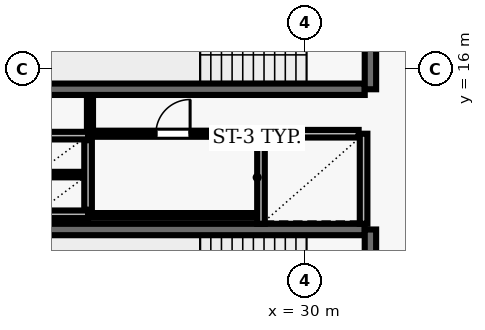
"""IFC4 building model, lengths in metres.
Left out: names, types, materials, properties, quantities, classifications, styles, units other than length and angle.
Written with IfcOpenShell. Run it as: python <this file> out.ifc"""

import sys

from ifc_helpers import new_model, si_unit, direction, frame, frame_2d, origin, place, context, subcontext, project, spatial, rectangle, extrude, element, fill, save


model = new_model("IFC4")
c1 = context("Model", 3, precision=1e-05, world=origin(), true_north=direction((0.0, 1.0)))
c2 = subcontext(c1, "Body", "Model", "MODEL_VIEW")
j1 = project(units=[si_unit("LENGTHUNIT", "METRE"), si_unit("PLANEANGLEUNIT", "RADIAN")], contexts=[c1])
p1 = place(None, origin())
s1 = spatial("IfcSite", under=j1, at=p1, CompositionType="ELEMENT")
p2 = place(p1, origin())
s2 = spatial("IfcBuilding", under=s1, at=p2, CompositionType="ELEMENT")
p3 = place(p2, frame((0.0, 0.0, 146.3)))
s3 = spatial("IfcBuildingStorey", under=s2, at=p3, CompositionType="ELEMENT", Elevation=146.3)
p4 = place(p3, frame((23.22, 15.47, 0.0), z_axis=(0.0, 0.0, 1.0), x_axis=(1.0, 0.0, 0.0)))
e1 = element("IfcWall", 1, at=p4, inside=s3, PredefinedType="SHEAR", context=c2, shape_type="SweptSolid", body=[
    extrude(rectangle(XDim=8.36, YDim=0.3, at=frame_2d((4.18, 0.0))), origin(), (0.0, 0.0, 1.0), 3.69),
])
p5 = place(p3, frame((31.73, 15.47, 0.0), z_axis=(0.0, 0.0, 1.0), x_axis=(0.0, 1.0, 0.0)))
e2 = element("IfcWall", 2, at=p5, inside=s3, PredefinedType="SHEAR", context=c2, shape_type="SweptSolid", body=[
    extrude(rectangle(XDim=3.51, YDim=0.3, at=frame_2d((1.755, 0.0))), origin(), (0.0, 0.0, 1.0), 3.69),
])
p6 = place(p5, frame((1.18, 0.0, 0.0)))
e3 = element("IfcOpeningElement", 3, at=p6, cuts=e2, PredefinedType="OPENING", context=c2, shape_type="SweptSolid", body=[
    extrude(rectangle(XDim=1.15, YDim=2.15, at=frame_2d((0.575, 1.075))), frame((0.0, 0.16, 0.0), z_axis=(0.0, -1.0, 0.0), x_axis=(1.0, 0.0, 0.0)), (0.0, 0.0, 1.0), 0.32),
])
p7 = place(p3, frame((31.58, 11.78, 0.0), z_axis=(0.0, 0.0, 1.0), x_axis=(-1.0, 0.0, 0.0)))
e4 = element("IfcWall", 4, at=p7, inside=s3, PredefinedType="SHEAR", context=c2, shape_type="SweptSolid", body=[
    extrude(rectangle(XDim=8.36, YDim=0.3, at=frame_2d((4.18, 0.0))), origin(), (0.0, 0.0, 1.0), 3.69),
])
p8 = place(p3, frame((31.73, 8.27, 0.0), z_axis=(0.0, 0.0, 1.0), x_axis=(0.0, 1.0, 0.0)))
e5 = element("IfcWall", 5, at=p8, inside=s3, PredefinedType="SHEAR", context=c2, shape_type="SweptSolid", body=[
    extrude(rectangle(XDim=3.51, YDim=0.3, at=frame_2d((1.755, 0.0))), origin(), (0.0, 0.0, 1.0), 3.69),
])
p9 = place(p8, frame((1.18, 0.0, 0.0)))
e6 = element("IfcOpeningElement", 6, at=p9, cuts=e5, PredefinedType="OPENING", context=c2, shape_type="SweptSolid", body=[
    extrude(rectangle(XDim=1.15, YDim=2.15, at=frame_2d((0.575, 1.075))), frame((0.0, 0.16, 0.0), z_axis=(0.0, -1.0, 0.0), x_axis=(1.0, 0.0, 0.0)), (0.0, 0.0, 1.0), 0.32),
])
for number, where, z_axis, x_axis in (
    (7, (28.85, 14.3, 0.0), (0.0, 0.0, 1.0), (0.0, -1.0, 0.0)),
    (8, (31.55, 11.93, 0.0), (0.0, 0.0, 1.0), (0.0, 1.0, 0.0)),
):
    element("IfcWall", number, at=place(p3, frame(where, z_axis=z_axis, x_axis=x_axis)), inside=s3, PredefinedType="SOLIDWALL", context=c2, shape_type="SweptSolid", body=[
        extrude(rectangle(XDim=2.37, YDim=0.2, at=frame_2d((1.185, 0.0))), origin(), (0.0, 0.0, 1.0), 3.69),
    ])
p10 = place(p3, frame((31.42, 14.3, 0.0), z_axis=(0.0, 0.0, 1.0), x_axis=(-1.0, 0.0, 0.0)))
e9 = element("IfcWall", 9, at=p10, inside=s3, PredefinedType="SOLIDWALL", context=c2, shape_type="SweptSolid", body=[
    extrude(rectangle(XDim=2.44, YDim=0.2, at=frame_2d((1.22, 0.0))), origin(), (0.0, 0.0, 1.0), 3.69),
])
for number, where, z_axis, x_axis in (
    (10, (22.9, 14.25, 0.0), (0.0, 0.0, 1.0), (1.0, 0.0, 0.0)),
    (11, (22.9, 12.18, 0.0), (0.0, 0.0, 1.0), (1.0, 0.0, 0.0)),
):
    element("IfcWall", number, at=place(p3, frame(where, z_axis=z_axis, x_axis=x_axis)), inside=s3, PredefinedType="SOLIDWALL", context=c2, shape_type="SweptSolid", body=[
        extrude(rectangle(XDim=1.4, YDim=0.2, at=frame_2d((0.7, 0.0))), origin(), (0.0, 0.0, 1.0), 3.69),
    ])
p11 = place(p3, frame((24.3, 12.3, 0.0), z_axis=(0.0, 0.0, 1.0), x_axis=(0.0, 1.0, 0.0)))
e12 = element("IfcWall", 12, at=p11, inside=s3, PredefinedType="SOLIDWALL", context=c2, shape_type="SweptSolid", body=[
    extrude(rectangle(XDim=1.83, YDim=0.2, at=frame_2d((0.915, 0.0))), origin(), (0.0, 0.0, 1.0), 3.69),
])
p12 = place(p3, frame((23.01, 13.225, 0.0), z_axis=(0.0, 0.0, 1.0), x_axis=(1.0, 0.0, 0.0)))
e13 = element("IfcWall", 13, at=p12, inside=s3, PredefinedType="PARTITIONING", context=c2, shape_type="SweptSolid", body=[
    extrude(rectangle(XDim=1.18, YDim=0.145, at=frame_2d((0.59, 0.0))), origin(), (0.0, 0.0, 1.0), 3.69),
])
p13 = place(p3, frame((24.35, 12.15, 0.0), z_axis=(0.0, 0.0, 1.0), x_axis=(1.0, 0.0, 0.0)))
e14 = element("IfcWall", 14, at=p13, inside=s3, PredefinedType="PARTITIONING", context=c2, shape_type="SweptSolid", body=[
    extrude(rectangle(XDim=4.37, YDim=0.125, at=frame_2d((2.185, 0.0))), origin(), (0.0, 0.0, 1.0), 3.69),
])
p14 = place(p3, frame((24.35, 14.3, 0.0), z_axis=(0.0, 0.0, 1.0), x_axis=(1.0, 0.0, 0.0)))
e15 = element("IfcWall", 15, at=p14, inside=s3, PredefinedType="PARTITIONING", context=c2, shape_type="SweptSolid", body=[
    extrude(rectangle(XDim=4.37, YDim=0.16, at=frame_2d((2.185, 0.0))), origin(), (0.0, 0.0, 1.0), 3.69),
])
p15 = place(p14, frame((1.735, 0.0, 0.0)))
e16 = element("IfcOpeningElement", 16, at=p15, cuts=e15, PredefinedType="OPENING", context=c2, shape_type="SweptSolid", body=[
    extrude(rectangle(XDim=0.9, YDim=2.1, at=frame_2d((0.45, 1.05))), frame((0.0, 0.09, 0.0), z_axis=(0.0, -1.0, 0.0), x_axis=(1.0, 0.0, 0.0)), (0.0, 0.0, 1.0), 0.18),
])
p16 = place(p3, frame((24.35, 15.29, 0.0), z_axis=(0.0, 0.0, 1.0), x_axis=(0.0, -1.0, 0.0)))
e17 = element("IfcWall", 17, at=p16, inside=s3, PredefinedType="PARTITIONING", context=c2, shape_type="SweptSolid", body=[
    extrude(rectangle(XDim=0.915, YDim=0.16, at=frame_2d((0.458, 0.0))), origin(), (0.0, 0.0, 1.0), 3.69),
])
p17 = place(p15, origin())
e18 = element("IfcDoor", 18, at=p17, inside=s3, OperationType="SINGLE_SWING_RIGHT", PredefinedType="DOOR", context=c2, shape_type="SweptSolid", body=[
    extrude(rectangle(XDim=0.9, YDim=2.1, at=frame_2d((0.45, 1.05))), frame((0.0, 0.025, 0.0), z_axis=(0.0, -1.0, 0.0), x_axis=(1.0, 0.0, 0.0)), (0.0, 0.0, 1.0), 0.05),
])
fill(e16, e18)
save(model, sys.argv[1])
